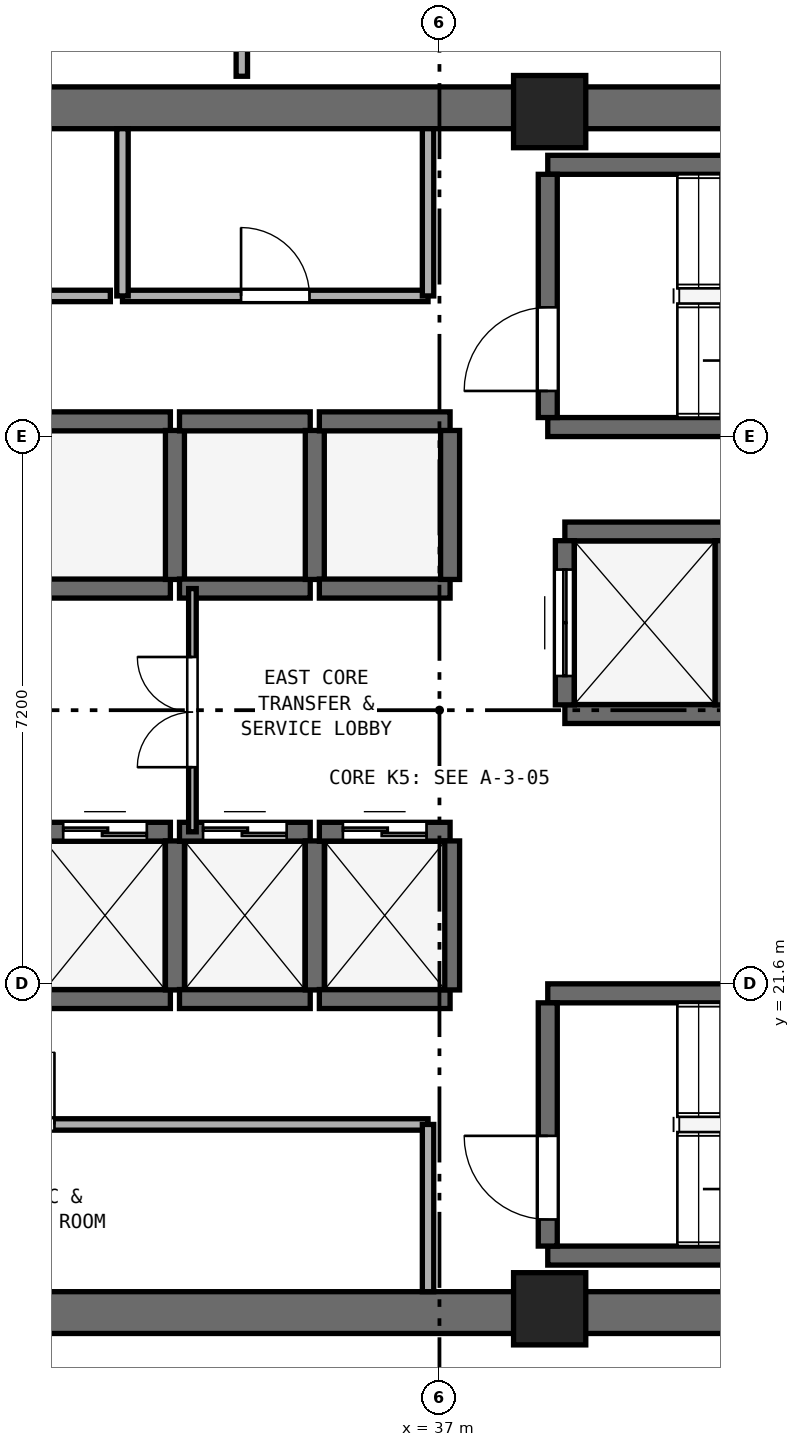
"""IFC4 building model, lengths in metres.
Left out: names, types, materials, properties, quantities, classifications, styles, units other than length and angle.
Written with IfcOpenShell. Run it as: python <this file> out.ifc"""

import sys

from ifc_helpers import new_model, si_unit, direction, frame, frame_2d, origin, origin_2d, place, context, subcontext, project, spatial, rectangle, extrude, element, fill, save


model = new_model("IFC4")
c1 = context("Model", 3, precision=1e-05, world=origin(), true_north=direction((0.0, 1.0)))
c2 = subcontext(c1, "Body", "Model", "MODEL_VIEW")
j1 = project(units=[si_unit("LENGTHUNIT", "METRE"), si_unit("PLANEANGLEUNIT", "RADIAN")], contexts=[c1])
p1 = place(None, origin())
s1 = spatial("IfcSite", under=j1, at=p1, CompositionType="ELEMENT")
p2 = place(p1, origin())
s2 = spatial("IfcBuilding", under=s1, at=p2, CompositionType="ELEMENT")
p3 = place(p2, frame((0.0, 0.0, 151.6)))
s3 = spatial("IfcBuildingStorey", under=s2, at=p3, CompositionType="ELEMENT", Elevation=151.6)
for number, where, z_axis, x_axis in (
    (1, (25.4, 17.275, 0.0), (0.0, 0.0, 1.0), (1.0, 0.0, 0.0)),
    (2, (25.4, 33.125, 0.0), (0.0, 0.0, 1.0), (1.0, 0.0, 0.0)),
):
    element("IfcWall", number, at=place(p3, frame(where, z_axis=z_axis, x_axis=x_axis)), inside=s3, PredefinedType="SHEAR", context=c2, shape_type="SweptSolid", body=[
        extrude(rectangle(XDim=23.2, YDim=0.55, at=frame_2d((11.6, 0.0))), origin(), (0.0, 0.0, 1.0), 3.54),
    ])
for number, where, z_axis, x_axis in (
    (3, (38.45, 17.325, 0.0), (0.0, 0.0, 1.0), (1.0, 0.0, 0.0)),
    (4, (38.45, 33.075, 0.0), (0.0, 0.0, 1.0), (1.0, 0.0, 0.0)),
):
    element("IfcColumn", number, at=place(p3, frame(where, z_axis=z_axis, x_axis=x_axis)), inside=s3, PredefinedType="PILASTER", context=c2, shape_type="SweptSolid", body=[
        extrude(rectangle(XDim=0.95, YDim=0.95, at=origin_2d()), origin(), (0.0, 0.0, 1.0), 3.8),
    ])
for number, where, z_axis, x_axis in (
    (5, (38.425, 28.925, 0.0), (0.0, 0.0, 1.0), (1.0, 0.0, 0.0)),
    (6, (38.425, 32.375, 0.0), (0.0, 0.0, 1.0), (1.0, 0.0, 0.0)),
):
    element("IfcWall", number, at=place(p3, frame(where, z_axis=z_axis, x_axis=x_axis)), inside=s3, PredefinedType="SHEAR", context=c2, shape_type="SweptSolid", body=[
        extrude(rectangle(XDim=7.3, YDim=0.25, at=frame_2d((3.65, 0.0))), origin(), (0.0, 0.0, 1.0), 3.54),
    ])
p4 = place(p3, frame((38.425, 29.05, 0.0), z_axis=(0.0, 0.0, 1.0), x_axis=(0.0, 1.0, 0.0)))
e7 = element("IfcWall", 7, at=p4, inside=s3, PredefinedType="SHEAR", context=c2, shape_type="SweptSolid", body=[
    extrude(rectangle(XDim=3.2, YDim=0.25, at=frame_2d((1.6, 0.0))), origin(), (0.0, 0.0, 1.0), 3.54),
])
p5 = place(p4, frame((0.35, 0.0, 0.0)))
e8 = element("IfcOpeningElement", 8, at=p5, cuts=e7, PredefinedType="OPENING", context=c2, shape_type="SweptSolid", body=[
    extrude(rectangle(XDim=1.1, YDim=2.15, at=frame_2d((0.55, 1.075))), frame((0.0, 0.135, 0.0), z_axis=(0.0, -1.0, 0.0), x_axis=(1.0, 0.0, 0.0)), (0.0, 0.0, 1.0), 0.27),
])
for number, where, z_axis, x_axis in (
    (9, (38.425, 18.025, 0.0), (0.0, 0.0, 1.0), (1.0, 0.0, 0.0)),
    (10, (38.425, 21.475, 0.0), (0.0, 0.0, 1.0), (1.0, 0.0, 0.0)),
):
    element("IfcWall", number, at=place(p3, frame(where, z_axis=z_axis, x_axis=x_axis)), inside=s3, PredefinedType="SHEAR", context=c2, shape_type="SweptSolid", body=[
        extrude(rectangle(XDim=7.3, YDim=0.25, at=frame_2d((3.65, 0.0))), origin(), (0.0, 0.0, 1.0), 3.54),
    ])
p6 = place(p3, frame((38.425, 18.15, 0.0), z_axis=(0.0, 0.0, 1.0), x_axis=(0.0, 1.0, 0.0)))
e11 = element("IfcWall", 11, at=p6, inside=s3, PredefinedType="SHEAR", context=c2, shape_type="SweptSolid", body=[
    extrude(rectangle(XDim=3.2, YDim=0.25, at=frame_2d((1.6, 0.0))), origin(), (0.0, 0.0, 1.0), 3.54),
])
p7 = place(p6, frame((0.35, 0.0, 0.0)))
e12 = element("IfcOpeningElement", 12, at=p7, cuts=e11, PredefinedType="OPENING", context=c2, shape_type="SweptSolid", body=[
    extrude(rectangle(XDim=1.1, YDim=2.15, at=frame_2d((0.55, 1.075))), frame((0.0, 0.135, 0.0), z_axis=(0.0, -1.0, 0.0), x_axis=(1.0, 0.0, 0.0)), (0.0, 0.0, 1.0), 0.27),
])
p8 = place(p3, frame((31.74, 21.4, 0.0), z_axis=(0.0, 0.0, 1.0), x_axis=(1.0, 0.0, 0.0)))
e13 = element("IfcWall", 13, at=p8, inside=s3, PredefinedType="SHEAR", context=c2, shape_type="SweptSolid", body=[
    extrude(rectangle(XDim=1.72, YDim=0.25, at=frame_2d((0.86, 0.0))), origin(), (0.0, 0.0, 1.0), 3.54),
])
p9 = place(p3, frame((31.74, 23.6, 0.0), z_axis=(0.0, 0.0, 1.0), x_axis=(1.0, 0.0, 0.0)))
e14 = element("IfcWall", 14, at=p9, inside=s3, PredefinedType="SHEAR", context=c2, shape_type="SweptSolid", body=[
    extrude(rectangle(XDim=1.72, YDim=0.25, at=frame_2d((0.86, 0.0))), origin(), (0.0, 0.0, 1.0), 3.54),
])
p10 = place(p9, frame((0.31, 0.0, 0.0)))
e15 = element("IfcOpeningElement", 15, at=p10, cuts=e14, PredefinedType="OPENING", context=c2, shape_type="SweptSolid", body=[
    extrude(rectangle(XDim=1.1, YDim=2.15, at=frame_2d((0.55, 1.075))), frame((0.0, 0.135, 0.0), z_axis=(0.0, -1.0, 0.0), x_axis=(1.0, 0.0, 0.0)), (0.0, 0.0, 1.0), 0.27),
])
p11 = place(p3, frame((33.52, 21.52, 0.0), z_axis=(0.0, 0.0, 1.0), x_axis=(0.0, 1.0, 0.0)))
e16 = element("IfcWall", 16, at=p11, inside=s3, PredefinedType="SHEAR", context=c2, shape_type="SweptSolid", body=[
    extrude(rectangle(XDim=1.96, YDim=0.25, at=frame_2d((0.98, 0.0))), origin(), (0.0, 0.0, 1.0), 3.54),
])
p12 = place(p3, frame((33.58, 21.4, 0.0), z_axis=(0.0, 0.0, 1.0), x_axis=(1.0, 0.0, 0.0)))
e17 = element("IfcWall", 17, at=p12, inside=s3, PredefinedType="SHEAR", context=c2, shape_type="SweptSolid", body=[
    extrude(rectangle(XDim=1.72, YDim=0.25, at=frame_2d((0.86, 0.0))), origin(), (0.0, 0.0, 1.0), 3.54),
])
p13 = place(p3, frame((33.58, 23.6, 0.0), z_axis=(0.0, 0.0, 1.0), x_axis=(1.0, 0.0, 0.0)))
e18 = element("IfcWall", 18, at=p13, inside=s3, PredefinedType="SHEAR", context=c2, shape_type="SweptSolid", body=[
    extrude(rectangle(XDim=1.72, YDim=0.25, at=frame_2d((0.86, 0.0))), origin(), (0.0, 0.0, 1.0), 3.54),
])
p14 = place(p13, frame((0.31, 0.0, 0.0)))
e19 = element("IfcOpeningElement", 19, at=p14, cuts=e18, PredefinedType="OPENING", context=c2, shape_type="SweptSolid", body=[
    extrude(rectangle(XDim=1.1, YDim=2.15, at=frame_2d((0.55, 1.075))), frame((0.0, 0.135, 0.0), z_axis=(0.0, -1.0, 0.0), x_axis=(1.0, 0.0, 0.0)), (0.0, 0.0, 1.0), 0.27),
])
p15 = place(p3, frame((35.36, 21.52, 0.0), z_axis=(0.0, 0.0, 1.0), x_axis=(0.0, 1.0, 0.0)))
e20 = element("IfcWall", 20, at=p15, inside=s3, PredefinedType="SHEAR", context=c2, shape_type="SweptSolid", body=[
    extrude(rectangle(XDim=1.96, YDim=0.25, at=frame_2d((0.98, 0.0))), origin(), (0.0, 0.0, 1.0), 3.54),
])
p16 = place(p3, frame((35.42, 21.4, 0.0), z_axis=(0.0, 0.0, 1.0), x_axis=(1.0, 0.0, 0.0)))
e21 = element("IfcWall", 21, at=p16, inside=s3, PredefinedType="SHEAR", context=c2, shape_type="SweptSolid", body=[
    extrude(rectangle(XDim=1.72, YDim=0.25, at=frame_2d((0.86, 0.0))), origin(), (0.0, 0.0, 1.0), 3.54),
])
p17 = place(p3, frame((35.42, 23.6, 0.0), z_axis=(0.0, 0.0, 1.0), x_axis=(1.0, 0.0, 0.0)))
e22 = element("IfcWall", 22, at=p17, inside=s3, PredefinedType="SHEAR", context=c2, shape_type="SweptSolid", body=[
    extrude(rectangle(XDim=1.72, YDim=0.25, at=frame_2d((0.86, 0.0))), origin(), (0.0, 0.0, 1.0), 3.54),
])
p18 = place(p17, frame((0.31, 0.0, 0.0)))
e23 = element("IfcOpeningElement", 23, at=p18, cuts=e22, PredefinedType="OPENING", context=c2, shape_type="SweptSolid", body=[
    extrude(rectangle(XDim=1.1, YDim=2.15, at=frame_2d((0.55, 1.075))), frame((0.0, 0.135, 0.0), z_axis=(0.0, -1.0, 0.0), x_axis=(1.0, 0.0, 0.0)), (0.0, 0.0, 1.0), 0.27),
])
p19 = place(p3, frame((37.14, 21.52, 0.0), z_axis=(0.0, 0.0, 1.0), x_axis=(0.0, 1.0, 0.0)))
e24 = element("IfcWall", 24, at=p19, inside=s3, PredefinedType="SHEAR", context=c2, shape_type="SweptSolid", body=[
    extrude(rectangle(XDim=1.96, YDim=0.25, at=frame_2d((0.98, 0.0))), origin(), (0.0, 0.0, 1.0), 3.54),
])
for number, where, z_axis, x_axis in (
    (25, (31.74, 26.8, 0.0), (0.0, 0.0, 1.0), (1.0, 0.0, 0.0)),
    (26, (31.74, 29.0, 0.0), (0.0, 0.0, 1.0), (1.0, 0.0, 0.0)),
):
    element("IfcWall", number, at=place(p3, frame(where, z_axis=z_axis, x_axis=x_axis)), inside=s3, PredefinedType="SHEAR", context=c2, shape_type="SweptSolid", body=[
        extrude(rectangle(XDim=1.72, YDim=0.25, at=frame_2d((0.86, 0.0))), origin(), (0.0, 0.0, 1.0), 3.54),
    ])
p20 = place(p3, frame((33.52, 26.92, 0.0), z_axis=(0.0, 0.0, 1.0), x_axis=(0.0, 1.0, 0.0)))
e27 = element("IfcWall", 27, at=p20, inside=s3, PredefinedType="SHEAR", context=c2, shape_type="SweptSolid", body=[
    extrude(rectangle(XDim=1.96, YDim=0.25, at=frame_2d((0.98, 0.0))), origin(), (0.0, 0.0, 1.0), 3.54),
])
for number, where, z_axis, x_axis in (
    (28, (33.58, 26.8, 0.0), (0.0, 0.0, 1.0), (1.0, 0.0, 0.0)),
    (29, (33.58, 29.0, 0.0), (0.0, 0.0, 1.0), (1.0, 0.0, 0.0)),
):
    element("IfcWall", number, at=place(p3, frame(where, z_axis=z_axis, x_axis=x_axis)), inside=s3, PredefinedType="SHEAR", context=c2, shape_type="SweptSolid", body=[
        extrude(rectangle(XDim=1.72, YDim=0.25, at=frame_2d((0.86, 0.0))), origin(), (0.0, 0.0, 1.0), 3.54),
    ])
p21 = place(p3, frame((35.36, 26.92, 0.0), z_axis=(0.0, 0.0, 1.0), x_axis=(0.0, 1.0, 0.0)))
e30 = element("IfcWall", 30, at=p21, inside=s3, PredefinedType="SHEAR", context=c2, shape_type="SweptSolid", body=[
    extrude(rectangle(XDim=1.96, YDim=0.25, at=frame_2d((0.98, 0.0))), origin(), (0.0, 0.0, 1.0), 3.54),
])
for number, where, z_axis, x_axis in (
    (31, (35.42, 26.8, 0.0), (0.0, 0.0, 1.0), (1.0, 0.0, 0.0)),
    (32, (35.42, 29.0, 0.0), (0.0, 0.0, 1.0), (1.0, 0.0, 0.0)),
):
    element("IfcWall", number, at=place(p3, frame(where, z_axis=z_axis, x_axis=x_axis)), inside=s3, PredefinedType="SHEAR", context=c2, shape_type="SweptSolid", body=[
        extrude(rectangle(XDim=1.72, YDim=0.25, at=frame_2d((0.86, 0.0))), origin(), (0.0, 0.0, 1.0), 3.54),
    ])
p22 = place(p3, frame((37.14, 26.92, 0.0), z_axis=(0.0, 0.0, 1.0), x_axis=(0.0, 1.0, 0.0)))
e33 = element("IfcWall", 33, at=p22, inside=s3, PredefinedType="SHEAR", context=c2, shape_type="SweptSolid", body=[
    extrude(rectangle(XDim=1.96, YDim=0.25, at=frame_2d((0.98, 0.0))), origin(), (0.0, 0.0, 1.0), 3.54),
])
for number, where, z_axis, x_axis in (
    (34, (38.65, 25.15, 0.0), (0.0, 0.0, 1.0), (1.0, 0.0, 0.0)),
    (35, (38.65, 27.55, 0.0), (0.0, 0.0, 1.0), (1.0, 0.0, 0.0)),
):
    element("IfcWall", number, at=place(p3, frame(where, z_axis=z_axis, x_axis=x_axis)), inside=s3, PredefinedType="SHEAR", context=c2, shape_type="SweptSolid", body=[
        extrude(rectangle(XDim=2.1, YDim=0.25, at=frame_2d((1.05, 0.0))), origin(), (0.0, 0.0, 1.0), 3.54),
    ])
p23 = place(p3, frame((38.65, 25.27, 0.0), z_axis=(0.0, 0.0, 1.0), x_axis=(0.0, 1.0, 0.0)))
e36 = element("IfcWall", 36, at=p23, inside=s3, PredefinedType="SHEAR", context=c2, shape_type="SweptSolid", body=[
    extrude(rectangle(XDim=2.16, YDim=0.25, at=frame_2d((1.08, 0.0))), origin(), (0.0, 0.0, 1.0), 3.54),
])
p24 = place(p23, frame((0.38, 0.0, 0.0)))
e37 = element("IfcOpeningElement", 37, at=p24, cuts=e36, PredefinedType="OPENING", context=c2, shape_type="SweptSolid", body=[
    extrude(rectangle(XDim=1.4, YDim=2.2, at=frame_2d((0.7, 1.1))), frame((0.0, 0.135, 0.0), z_axis=(0.0, -1.0, 0.0), x_axis=(1.0, 0.0, 0.0)), (0.0, 0.0, 1.0), 0.27),
])
p25 = place(p3, frame((40.75, 25.27, 0.0), z_axis=(0.0, 0.0, 1.0), x_axis=(0.0, 1.0, 0.0)))
e38 = element("IfcWall", 38, at=p25, inside=s3, PredefinedType="SHEAR", context=c2, shape_type="SweptSolid", body=[
    extrude(rectangle(XDim=2.16, YDim=0.25, at=frame_2d((1.08, 0.0))), origin(), (0.0, 0.0, 1.0), 3.54),
])
p26 = place(p3, frame((29.43, 30.65, 0.0), z_axis=(0.0, 0.0, 1.0), x_axis=(1.0, 0.0, 0.0)))
e39 = element("IfcWall", 39, at=p26, inside=s3, PredefinedType="PARTITIONING", context=c2, shape_type="SweptSolid", body=[
    extrude(rectangle(XDim=3.24, YDim=0.15, at=frame_2d((1.62, 0.0))), origin(), (0.0, 0.0, 1.0), 3.54),
])
p27 = place(p26, frame((1.145, 0.0, 0.0)))
e40 = element("IfcOpeningElement", 40, at=p27, cuts=e39, PredefinedType="OPENING", context=c2, shape_type="SweptSolid", body=[
    extrude(rectangle(XDim=0.95, YDim=2.1, at=frame_2d((0.475, 1.05))), frame((0.0, 0.085, 0.0), z_axis=(0.0, -1.0, 0.0), x_axis=(1.0, 0.0, 0.0)), (0.0, 0.0, 1.0), 0.17),
])
p28 = place(p3, frame((32.83, 30.65, 0.0), z_axis=(0.0, 0.0, 1.0), x_axis=(1.0, 0.0, 0.0)))
e41 = element("IfcWall", 41, at=p28, inside=s3, PredefinedType="PARTITIONING", context=c2, shape_type="SweptSolid", body=[
    extrude(rectangle(XDim=4.02, YDim=0.15, at=frame_2d((2.01, 0.0))), origin(), (0.0, 0.0, 1.0), 3.54),
])
p29 = place(p28, frame((1.56, 0.0, 0.0)))
e42 = element("IfcOpeningElement", 42, at=p29, cuts=e41, PredefinedType="OPENING", context=c2, shape_type="SweptSolid", body=[
    extrude(rectangle(XDim=0.9, YDim=2.1, at=frame_2d((0.45, 1.05))), frame((0.0, 0.085, 0.0), z_axis=(0.0, -1.0, 0.0), x_axis=(1.0, 0.0, 0.0)), (0.0, 0.0, 1.0), 0.17),
])
for number, where, z_axis, x_axis in (
    (43, (32.83, 30.65, 0.0), (0.0, 0.0, 1.0), (0.0, 1.0, 0.0)),
    (44, (36.85, 30.65, 0.0), (0.0, 0.0, 1.0), (0.0, 1.0, 0.0)),
):
    element("IfcWall", number, at=place(p3, frame(where, z_axis=z_axis, x_axis=x_axis)), inside=s3, PredefinedType="PARTITIONING", context=c2, shape_type="SweptSolid", body=[
        extrude(rectangle(XDim=2.2, YDim=0.15, at=frame_2d((1.1, 0.0))), origin(), (0.0, 0.0, 1.0), 3.54),
    ])
p30 = place(p3, frame((26.07, 19.75, 0.0), z_axis=(0.0, 0.0, 1.0), x_axis=(1.0, 0.0, 0.0)))
e45 = element("IfcWall", 45, at=p30, inside=s3, PredefinedType="PARTITIONING", context=c2, shape_type="SweptSolid", body=[
    extrude(rectangle(XDim=10.78, YDim=0.15, at=frame_2d((5.39, 0.0))), origin(), (0.0, 0.0, 1.0), 3.54),
])
p31 = place(p30, frame((4.915, 0.0, 0.0)))
e46 = element("IfcOpeningElement", 46, at=p31, cuts=e45, PredefinedType="OPENING", context=c2, shape_type="SweptSolid", body=[
    extrude(rectangle(XDim=0.95, YDim=2.1, at=frame_2d((0.475, 1.05))), frame((0.0, 0.085, 0.0), z_axis=(0.0, -1.0, 0.0), x_axis=(1.0, 0.0, 0.0)), (0.0, 0.0, 1.0), 0.17),
])
p32 = place(p3, frame((36.85, 17.55, 0.0), z_axis=(0.0, 0.0, 1.0), x_axis=(0.0, 1.0, 0.0)))
e47 = element("IfcWall", 47, at=p32, inside=s3, PredefinedType="PARTITIONING", context=c2, shape_type="SweptSolid", body=[
    extrude(rectangle(XDim=2.2, YDim=0.15, at=frame_2d((1.1, 0.0))), origin(), (0.0, 0.0, 1.0), 3.54),
])
p33 = place(p3, frame((33.75, 23.6, 0.0), z_axis=(0.0, 0.0, 1.0), x_axis=(0.0, 1.0, 0.0)))
e48 = element("IfcWall", 48, at=p33, inside=s3, PredefinedType="PARTITIONING", context=c2, shape_type="SweptSolid", body=[
    extrude(rectangle(XDim=3.2, YDim=0.1, at=frame_2d((1.6, 0.0))), origin(), (0.0, 0.0, 1.0), 3.54),
])
p34 = place(p33, frame((0.85, 0.0, 0.0)))
e49 = element("IfcOpeningElement", 49, at=p34, cuts=e48, PredefinedType="OPENING", context=c2, shape_type="SweptSolid", body=[
    extrude(rectangle(XDim=1.45, YDim=2.12, at=frame_2d((0.725, 1.06))), frame((0.0, 0.06, 0.0), z_axis=(0.0, -1.0, 0.0), x_axis=(1.0, 0.0, 0.0)), (0.0, 0.0, 1.0), 0.12),
])
p35 = place(p3, frame((34.4, 33.54, 0.0), z_axis=(0.0, 0.0, 1.0), x_axis=(0.0, 1.0, 0.0)))
e50 = element("IfcWall", 50, at=p35, inside=s3, PredefinedType="PARTITIONING", context=c2, shape_type="SweptSolid", body=[
    extrude(rectangle(XDim=1.81, YDim=0.15, at=frame_2d((0.905, 0.0))), origin(), (0.0, 0.0, 1.0), 3.54),
])
p36 = place(p5, origin())
e51 = element("IfcDoor", 51, at=p36, inside=s3, OperationType="SINGLE_SWING_LEFT", PredefinedType="DOOR", context=c2, shape_type="SweptSolid", body=[
    extrude(rectangle(XDim=1.1, YDim=2.15, at=frame_2d((0.55, 1.075))), frame((0.0, 0.025, 0.0), z_axis=(0.0, -1.0, 0.0), x_axis=(1.0, 0.0, 0.0)), (0.0, 0.0, 1.0), 0.05),
])
fill(e8, e51)
p37 = place(p7, origin())
e52 = element("IfcDoor", 52, at=p37, inside=s3, OperationType="SINGLE_SWING_RIGHT", PredefinedType="DOOR", context=c2, shape_type="SweptSolid", body=[
    extrude(rectangle(XDim=1.1, YDim=2.15, at=frame_2d((0.55, 1.075))), frame((0.0, 0.025, 0.0), z_axis=(0.0, -1.0, 0.0), x_axis=(1.0, 0.0, 0.0)), (0.0, 0.0, 1.0), 0.05),
])
fill(e12, e52)
p38 = place(p10, origin())
e53 = element("IfcDoor", 53, at=p38, inside=s3, OperationType="DOUBLE_DOOR_SLIDING", PredefinedType="DOOR", context=c2, shape_type="SweptSolid", body=[
    extrude(rectangle(XDim=1.1, YDim=2.15, at=frame_2d((0.55, 1.075))), frame((0.0, 0.025, 0.0), z_axis=(0.0, -1.0, 0.0), x_axis=(1.0, 0.0, 0.0)), (0.0, 0.0, 1.0), 0.05),
])
fill(e15, e53)
p39 = place(p14, origin())
e54 = element("IfcDoor", 54, at=p39, inside=s3, OperationType="DOUBLE_DOOR_SLIDING", PredefinedType="DOOR", context=c2, shape_type="SweptSolid", body=[
    extrude(rectangle(XDim=1.1, YDim=2.15, at=frame_2d((0.55, 1.075))), frame((0.0, 0.025, 0.0), z_axis=(0.0, -1.0, 0.0), x_axis=(1.0, 0.0, 0.0)), (0.0, 0.0, 1.0), 0.05),
])
fill(e19, e54)
p40 = place(p18, origin())
e55 = element("IfcDoor", 55, at=p40, inside=s3, OperationType="DOUBLE_DOOR_SLIDING", PredefinedType="DOOR", context=c2, shape_type="SweptSolid", body=[
    extrude(rectangle(XDim=1.1, YDim=2.15, at=frame_2d((0.55, 1.075))), frame((0.0, 0.025, 0.0), z_axis=(0.0, -1.0, 0.0), x_axis=(1.0, 0.0, 0.0)), (0.0, 0.0, 1.0), 0.05),
])
fill(e23, e55)
p41 = place(p24, origin())
e56 = element("IfcDoor", 56, at=p41, inside=s3, OperationType="DOUBLE_DOOR_SLIDING", PredefinedType="DOOR", context=c2, shape_type="SweptSolid", body=[
    extrude(rectangle(XDim=1.4, YDim=2.2, at=frame_2d((0.7, 1.1))), frame((0.0, 0.025, 0.0), z_axis=(0.0, -1.0, 0.0), x_axis=(1.0, 0.0, 0.0)), (0.0, 0.0, 1.0), 0.05),
])
fill(e37, e56)
p42 = place(p29, origin())
e57 = element("IfcDoor", 57, at=p42, inside=s3, OperationType="SINGLE_SWING_LEFT", PredefinedType="DOOR", context=c2, shape_type="SweptSolid", body=[
    extrude(rectangle(XDim=0.9, YDim=2.1, at=frame_2d((0.45, 1.05))), frame((0.0, 0.025, 0.0), z_axis=(0.0, -1.0, 0.0), x_axis=(1.0, 0.0, 0.0)), (0.0, 0.0, 1.0), 0.05),
])
fill(e42, e57)
p43 = place(p31, origin())
e58 = element("IfcDoor", 58, at=p43, inside=s3, OperationType="SINGLE_SWING_RIGHT", PredefinedType="DOOR", context=c2, shape_type="SweptSolid", body=[
    extrude(rectangle(XDim=0.95, YDim=2.1, at=frame_2d((0.475, 1.05))), frame((0.0, 0.025, 0.0), z_axis=(0.0, -1.0, 0.0), x_axis=(1.0, 0.0, 0.0)), (0.0, 0.0, 1.0), 0.05),
])
fill(e46, e58)
p44 = place(p34, origin())
e59 = element("IfcDoor", 59, at=p44, inside=s3, OperationType="DOUBLE_DOOR_SINGLE_SWING", PredefinedType="DOOR", context=c2, shape_type="SweptSolid", body=[
    extrude(rectangle(XDim=1.45, YDim=2.12, at=frame_2d((0.725, 1.06))), frame((0.0, 0.025, 0.0), z_axis=(0.0, -1.0, 0.0), x_axis=(1.0, 0.0, 0.0)), (0.0, 0.0, 1.0), 0.05),
])
fill(e49, e59)
save(model, sys.argv[1])
